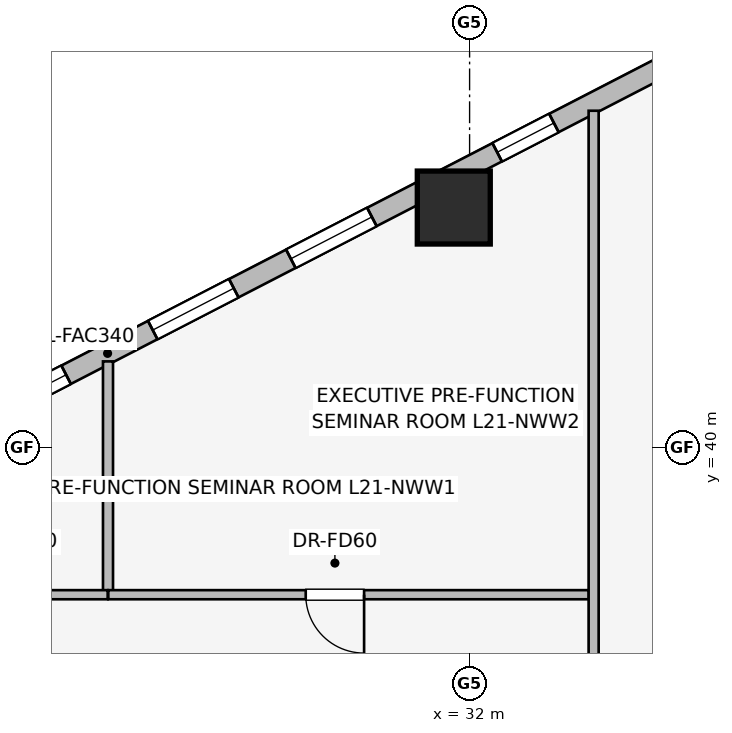
"""IFC4 building model, lengths in metres.
Left out: names, types, materials, properties, quantities, classifications, styles, units other than length and angle.
Written with IfcOpenShell. Run it as: python <this file> out.ifc"""

import sys

from ifc_helpers import new_model, si_unit, direction, frame, frame_2d, origin, origin_2d, place, context, subcontext, project, spatial, rectangle, extrude, element, fill, save


model = new_model("IFC4")
c1 = context("Model", 3, precision=1e-05, world=origin(), true_north=direction((0.0, 1.0)))
c2 = subcontext(c1, "Body", "Model", "MODEL_VIEW")
j1 = project(units=[si_unit("LENGTHUNIT", "METRE"), si_unit("PLANEANGLEUNIT", "RADIAN")], contexts=[c1])
p1 = place(None, origin())
s1 = spatial("IfcSite", under=j1, at=p1, CompositionType="ELEMENT")
p2 = place(p1, origin())
s2 = spatial("IfcBuilding", under=s1, at=p2, CompositionType="ELEMENT")
p3 = place(p2, frame((0.0, 0.0, 81.75)))
s3 = spatial("IfcBuildingStorey", under=s2, at=p3, CompositionType="ELEMENT", Elevation=81.75)
p4 = place(p3, frame((31.74, 43.947, 0.0), z_axis=(0.0, 0.0, 1.0), x_axis=(1.0, 0.0, 0.0)))
e1 = element("IfcColumn", 1, at=p4, inside=s3, PredefinedType="COLUMN", context=c2, shape_type="SweptSolid", body=[
    extrude(rectangle(XDim=1.2, YDim=1.2, at=origin_2d()), origin(), (0.0, 0.0, 1.0), 3.65),
])
p5 = place(p3, frame((16.924, 36.841, 0.0), z_axis=(0.0, 0.0, 1.0), x_axis=(0.888634413993, 0.458616264721, 0.0)))
e2 = element("IfcWall", 2, at=p5, inside=s3, PredefinedType="STANDARD", context=c2, shape_type="SweptSolid", body=[
    extrude(rectangle(XDim=20.531, YDim=0.34, at=frame_2d((10.266, 0.0))), origin(), (0.0, 0.0, 1.0), 2.684),
])
p6 = place(p5, frame((5.197, 0.0, 0.75)))
e3 = element("IfcOpeningElement", 3, at=p6, cuts=e2, PredefinedType="OPENING", context=c2, shape_type="SweptSolid", body=[
    extrude(rectangle(XDim=1.8, YDim=1.5, at=frame_2d((0.9, 0.75))), frame((0.0, 0.18, 0.0), z_axis=(0.0, -1.0, 0.0), x_axis=(1.0, 0.0, 0.0)), (0.0, 0.0, 1.0), 0.36),
])
p7 = place(p5, frame((7.698, 0.0, 0.75)))
e4 = element("IfcOpeningElement", 4, at=p7, cuts=e2, PredefinedType="OPENING", context=c2, shape_type="SweptSolid", body=[
    extrude(rectangle(XDim=1.8, YDim=1.5, at=frame_2d((0.9, 0.75))), frame((0.0, 0.18, 0.0), z_axis=(0.0, -1.0, 0.0), x_axis=(1.0, 0.0, 0.0)), (0.0, 0.0, 1.0), 0.36),
])
p8 = place(p5, frame((11.101, 0.0, 0.75)))
e5 = element("IfcOpeningElement", 5, at=p8, cuts=e2, PredefinedType="OPENING", context=c2, shape_type="SweptSolid", body=[
    extrude(rectangle(XDim=1.5, YDim=1.5, at=frame_2d((0.75, 0.75))), frame((0.0, 0.18, 0.0), z_axis=(0.0, -1.0, 0.0), x_axis=(1.0, 0.0, 0.0)), (0.0, 0.0, 1.0), 0.36),
])
p9 = place(p5, frame((13.657, 0.0, 0.75)))
e6 = element("IfcOpeningElement", 6, at=p9, cuts=e2, PredefinedType="OPENING", context=c2, shape_type="SweptSolid", body=[
    extrude(rectangle(XDim=1.5, YDim=1.5, at=frame_2d((0.75, 0.75))), frame((0.0, 0.18, 0.0), z_axis=(0.0, -1.0, 0.0), x_axis=(1.0, 0.0, 0.0)), (0.0, 0.0, 1.0), 0.36),
])
p10 = place(p5, frame((17.476, 0.0, 0.75)))
e7 = element("IfcOpeningElement", 7, at=p10, cuts=e2, PredefinedType="OPENING", context=c2, shape_type="SweptSolid", body=[
    extrude(rectangle(XDim=1.05, YDim=1.4, at=frame_2d((0.525, 0.7))), frame((0.0, 0.18, 0.0), z_axis=(0.0, -1.0, 0.0), x_axis=(1.0, 0.0, 0.0)), (0.0, 0.0, 1.0), 0.36),
])
p11 = place(p3, frame((26.053, 37.61, 0.0), z_axis=(0.0, 0.0, 1.0), x_axis=(0.0, 1.0, 0.0)))
e8 = element("IfcWall", 8, at=p11, inside=s3, PredefinedType="PARTITIONING", context=c2, shape_type="SweptSolid", body=[
    extrude(rectangle(XDim=3.807, YDim=0.165, at=frame_2d((1.903, 0.0))), origin(), (0.0, 0.0, 1.0), 3.39),
])
p12 = place(p3, frame((26.048, 37.58, 0.0), z_axis=(0.0, 0.0, 1.0), x_axis=(-1.0, 0.0, 0.0)))
e9 = element("IfcWall", 9, at=p12, inside=s3, PredefinedType="PARTITIONING", context=c2, shape_type="SweptSolid", body=[
    extrude(rectangle(XDim=7.398, YDim=0.15, at=frame_2d((3.699, 0.0))), origin(), (0.0, 0.0, 1.0), 3.39),
])
p13 = place(p12, frame((1.036, 0.0, 0.0)))
e10 = element("IfcOpeningElement", 10, at=p13, cuts=e9, PredefinedType="OPENING", context=c2, shape_type="SweptSolid", body=[
    extrude(rectangle(XDim=0.96, YDim=2.0, at=frame_2d((0.48, 1.0))), frame((0.0, 0.085, 0.0), z_axis=(0.0, -1.0, 0.0), x_axis=(1.0, 0.0, 0.0)), (0.0, 0.0, 1.0), 0.17),
])
p14 = place(p3, frame((33.962, 37.58, 0.0), z_axis=(0.0, 0.0, 1.0), x_axis=(-1.0, 0.0, 0.0)))
e11 = element("IfcWall", 11, at=p14, inside=s3, PredefinedType="PARTITIONING", context=c2, shape_type="SweptSolid", body=[
    extrude(rectangle(XDim=7.904, YDim=0.15, at=frame_2d((3.952, 0.0))), origin(), (0.0, 0.0, 1.0), 3.39),
])
p15 = place(p14, frame((3.697, 0.0, 0.0)))
e12 = element("IfcOpeningElement", 12, at=p15, cuts=e11, PredefinedType="OPENING", context=c2, shape_type="SweptSolid", body=[
    extrude(rectangle(XDim=0.96, YDim=2.0, at=frame_2d((0.48, 1.0))), frame((0.0, 0.085, 0.0), z_axis=(0.0, -1.0, 0.0), x_axis=(1.0, 0.0, 0.0)), (0.0, 0.0, 1.0), 0.17),
])
p16 = place(p3, frame((34.04, 31.96, 0.0), z_axis=(0.0, 0.0, 1.0), x_axis=(0.0, 1.0, 0.0)))
e13 = element("IfcWall", 13, at=p16, inside=s3, PredefinedType="PARTITIONING", context=c2, shape_type="SweptSolid", body=[
    extrude(rectangle(XDim=13.579, YDim=0.165, at=frame_2d((6.79, 0.0))), origin(), (0.0, 0.0, 1.0), 3.39),
])
p17 = place(p7, origin())
e14 = element("IfcWindow", 14, at=p17, inside=s3, PartitioningType="SINGLE_PANEL", PredefinedType="WINDOW", context=c2, shape_type="SweptSolid", body=[
    extrude(rectangle(XDim=1.8, YDim=1.5, at=frame_2d((0.9, 0.75))), frame((0.0, 0.03, 0.0), z_axis=(0.0, -1.0, 0.0), x_axis=(1.0, 0.0, 0.0)), (0.0, 0.0, 1.0), 0.06),
])
fill(e4, e14)
p18 = place(p8, origin())
e15 = element("IfcWindow", 15, at=p18, inside=s3, PartitioningType="SINGLE_PANEL", PredefinedType="WINDOW", context=c2, shape_type="SweptSolid", body=[
    extrude(rectangle(XDim=1.5, YDim=1.5, at=frame_2d((0.75, 0.75))), frame((0.0, 0.03, 0.0), z_axis=(0.0, -1.0, 0.0), x_axis=(1.0, 0.0, 0.0)), (0.0, 0.0, 1.0), 0.06),
])
fill(e5, e15)
p19 = place(p9, origin())
e16 = element("IfcWindow", 16, at=p19, inside=s3, PartitioningType="SINGLE_PANEL", PredefinedType="WINDOW", context=c2, shape_type="SweptSolid", body=[
    extrude(rectangle(XDim=1.5, YDim=1.5, at=frame_2d((0.75, 0.75))), frame((0.0, 0.03, 0.0), z_axis=(0.0, -1.0, 0.0), x_axis=(1.0, 0.0, 0.0)), (0.0, 0.0, 1.0), 0.06),
])
fill(e6, e16)
p20 = place(p10, origin())
e17 = element("IfcWindow", 17, at=p20, inside=s3, PartitioningType="SINGLE_PANEL", PredefinedType="WINDOW", context=c2, shape_type="SweptSolid", body=[
    extrude(rectangle(XDim=1.05, YDim=1.4, at=frame_2d((0.525, 0.7))), frame((0.0, 0.03, 0.0), z_axis=(0.0, -1.0, 0.0), x_axis=(1.0, 0.0, 0.0)), (0.0, 0.0, 1.0), 0.06),
])
fill(e7, e17)
p21 = place(p15, origin())
e18 = element("IfcDoor", 18, at=p21, inside=s3, OperationType="SINGLE_SWING_LEFT", PredefinedType="DOOR", context=c2, shape_type="SweptSolid", body=[
    extrude(rectangle(XDim=0.96, YDim=2.0, at=frame_2d((0.48, 1.0))), frame((0.0, 0.025, 0.0), z_axis=(0.0, -1.0, 0.0), x_axis=(1.0, 0.0, 0.0)), (0.0, 0.0, 1.0), 0.05),
])
fill(e12, e18)
save(model, sys.argv[1])
